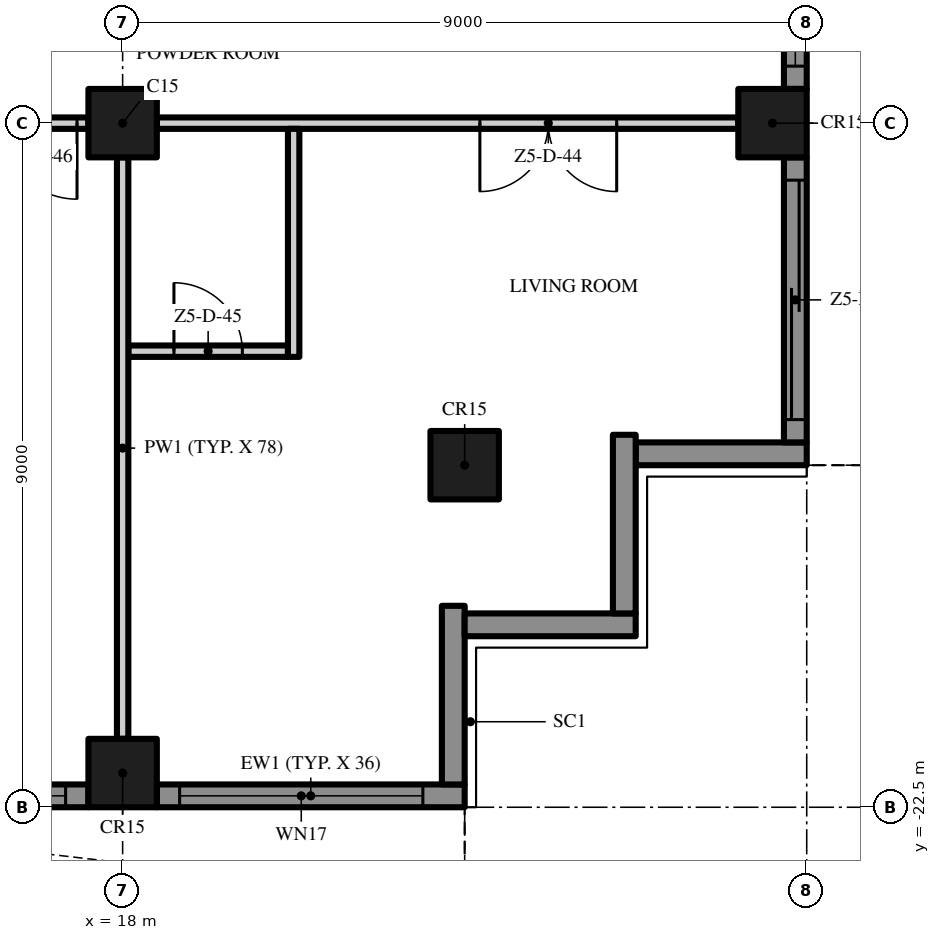
"""IFC4 building model, lengths in metres.
Left out: names, types, materials, properties, quantities, classifications, styles, units other than length and angle.
Written with IfcOpenShell. Run it as: python <this file> out.ifc"""

import sys

from ifc_helpers import new_model, si_unit, direction, frame, frame_2d, origin, origin_2d, place, context, subcontext, project, spatial, polyline, rectangle, outline, extrude, element, fill, save


model = new_model("IFC4")
c1 = context("Model", 3, precision=1e-05, world=origin(), true_north=direction((0.0, 1.0)))
c2 = subcontext(c1, "Body", "Model", "MODEL_VIEW")
j1 = project(units=[si_unit("LENGTHUNIT", "METRE"), si_unit("PLANEANGLEUNIT", "RADIAN")], contexts=[c1])
p1 = place(None, origin())
s1 = spatial("IfcSite", under=j1, at=p1, CompositionType="ELEMENT")
p2 = place(p1, origin())
s2 = spatial("IfcBuilding", under=s1, at=p2, CompositionType="ELEMENT")
p3 = place(p2, frame((0.0, 0.0, 276.8)))
s3 = spatial("IfcBuildingStorey", under=s2, at=p3, CompositionType="ELEMENT", Elevation=276.8)
for number, where, z_axis, x_axis in (
    (1, (18.0, -13.5, 0.0), (0.0, 0.0, 1.0), (1.0, 0.0, 0.0)),
    (2, (18.0, -22.05, 0.0), (0.0, 0.0, 1.0), (1.0, 0.0, 0.0)),
    (3, (26.55, -13.5, 0.0), (0.0, 0.0, 1.0), (1.0, 0.0, 0.0)),
    (4, (22.5, -18.0, 0.0), (0.0, 0.0, 1.0), (1.0, 0.0, 0.0)),
):
    element("IfcColumn", number, at=place(p3, frame(where, z_axis=z_axis, x_axis=x_axis)), inside=s3, PredefinedType="COLUMN", context=c2, shape_type="SweptSolid", body=[
        extrude(rectangle(XDim=0.9, YDim=0.9, at=origin_2d()), origin(), (0.0, 0.0, 1.0), 3.5),
    ])
p4 = place(p3, frame((17.55, -22.35, 0.0), z_axis=(0.0, 0.0, 1.0), x_axis=(-1.0, 0.0, 0.0)))
e5 = element("IfcWall", 5, at=p4, inside=s3, PredefinedType="SOLIDWALL", context=c2, shape_type="SweptSolid", body=[
    extrude(rectangle(XDim=8.1, YDim=0.3, at=frame_2d((4.05, 0.0))), origin(), (0.0, 0.0, 1.0), 3.5),
])
p5 = place(p4, frame((4.6, 0.0, 0.0)))
e6 = element("IfcOpeningElement", 6, at=p5, cuts=e5, PredefinedType="OPENING", context=c2, shape_type="SweptSolid", body=[
    extrude(rectangle(XDim=3.2, YDim=2.4, at=frame_2d((1.6, 1.2))), frame((0.0, 0.16, 0.0), z_axis=(0.0, -1.0, 0.0), x_axis=(1.0, 0.0, 0.0)), (0.0, 0.0, 1.0), 0.32),
])
p6 = place(p4, frame((0.3, 0.0, 0.45)))
e7 = element("IfcOpeningElement", 7, at=p6, cuts=e5, PredefinedType="OPENING", context=c2, shape_type="SweptSolid", body=[
    extrude(rectangle(XDim=3.2, YDim=2.65, at=frame_2d((1.6, 1.325))), frame((0.0, 0.16, 0.0), z_axis=(0.0, -1.0, 0.0), x_axis=(1.0, 0.0, 0.0)), (0.0, 0.0, 1.0), 0.32),
])
p7 = place(p3, frame((22.5, -22.35, 0.0), z_axis=(0.0, 0.0, 1.0), x_axis=(-1.0, 0.0, 0.0)))
e8 = element("IfcWall", 8, at=p7, inside=s3, PredefinedType="SOLIDWALL", context=c2, shape_type="SweptSolid", body=[
    extrude(rectangle(XDim=4.05, YDim=0.3, at=frame_2d((2.025, 0.0))), origin(), (0.0, 0.0, 1.0), 3.5),
])
p8 = place(p7, frame((0.55, 0.0, 0.45)))
e9 = element("IfcOpeningElement", 9, at=p8, cuts=e8, PredefinedType="OPENING", context=c2, shape_type="SweptSolid", body=[
    extrude(rectangle(XDim=3.2, YDim=2.65, at=frame_2d((1.6, 1.325))), frame((0.0, 0.16, 0.0), z_axis=(0.0, -1.0, 0.0), x_axis=(1.0, 0.0, 0.0)), (0.0, 0.0, 1.0), 0.32),
])
p9 = place(p3, frame((22.35, -19.85, 0.0), z_axis=(0.0, 0.0, 1.0), x_axis=(0.0, -1.0, 0.0)))
e10 = element("IfcWall", 10, at=p9, inside=s3, PredefinedType="SOLIDWALL", context=c2, shape_type="SweptSolid", body=[
    extrude(rectangle(XDim=2.35, YDim=0.3, at=frame_2d((1.175, 0.0))), origin(), (0.0, 0.0, 1.0), 3.5),
])
p10 = place(p3, frame((24.75, -20.1, 0.0), z_axis=(0.0, 0.0, 1.0), x_axis=(-1.0, 0.0, 0.0)))
e11 = element("IfcWall", 11, at=p10, inside=s3, PredefinedType="SOLIDWALL", context=c2, shape_type="SweptSolid", body=[
    extrude(rectangle(XDim=2.25, YDim=0.3, at=frame_2d((1.125, 0.0))), origin(), (0.0, 0.0, 1.0), 3.5),
])
p11 = place(p3, frame((24.6, -17.6, 0.0), z_axis=(0.0, 0.0, 1.0), x_axis=(0.0, -1.0, 0.0)))
e12 = element("IfcWall", 12, at=p11, inside=s3, PredefinedType="SOLIDWALL", context=c2, shape_type="SweptSolid", body=[
    extrude(rectangle(XDim=2.35, YDim=0.3, at=frame_2d((1.175, 0.0))), origin(), (0.0, 0.0, 1.0), 3.5),
])
p12 = place(p3, frame((27.0, -17.85, 0.0), z_axis=(0.0, 0.0, 1.0), x_axis=(-1.0, 0.0, 0.0)))
e13 = element("IfcWall", 13, at=p12, inside=s3, PredefinedType="SOLIDWALL", context=c2, shape_type="SweptSolid", body=[
    extrude(rectangle(XDim=2.25, YDim=0.3, at=frame_2d((1.125, 0.0))), origin(), (0.0, 0.0, 1.0), 3.5),
])
p13 = place(p3, frame((26.85, -13.95, 0.0), z_axis=(0.0, 0.0, 1.0), x_axis=(0.0, -1.0, 0.0)))
e14 = element("IfcWall", 14, at=p13, inside=s3, PredefinedType="SOLIDWALL", context=c2, shape_type="SweptSolid", body=[
    extrude(rectangle(XDim=3.75, YDim=0.3, at=frame_2d((1.875, 0.0))), origin(), (0.0, 0.0, 1.0), 3.5),
])
p14 = place(p13, frame((0.3, 0.0, 0.0)))
e15 = element("IfcOpeningElement", 15, at=p14, cuts=e14, PredefinedType="OPENING", context=c2, shape_type="SweptSolid", body=[
    extrude(rectangle(XDim=3.15, YDim=2.4, at=frame_2d((1.575, 1.2))), frame((0.0, 0.16, 0.0), z_axis=(0.0, -1.0, 0.0), x_axis=(1.0, 0.0, 0.0)), (0.0, 0.0, 1.0), 0.32),
])
p15 = place(p3, frame((26.85, -4.95, 0.0), z_axis=(0.0, 0.0, 1.0), x_axis=(0.0, -1.0, 0.0)))
e16 = element("IfcWall", 16, at=p15, inside=s3, PredefinedType="SOLIDWALL", context=c2, shape_type="SweptSolid", body=[
    extrude(rectangle(XDim=8.1, YDim=0.3, at=frame_2d((4.05, 0.0))), origin(), (0.0, 0.0, 1.0), 3.5),
])
p16 = place(p15, frame((4.6, 0.0, 0.45)))
e17 = element("IfcOpeningElement", 17, at=p16, cuts=e16, PredefinedType="OPENING", context=c2, shape_type="SweptSolid", body=[
    extrude(rectangle(XDim=3.2, YDim=2.65, at=frame_2d((1.6, 1.325))), frame((0.0, 0.16, 0.0), z_axis=(0.0, -1.0, 0.0), x_axis=(1.0, 0.0, 0.0)), (0.0, 0.0, 1.0), 0.32),
])
p17 = place(p15, frame((0.3, 0.0, 0.45)))
e18 = element("IfcOpeningElement", 18, at=p17, cuts=e16, PredefinedType="OPENING", context=c2, shape_type="SweptSolid", body=[
    extrude(rectangle(XDim=3.2, YDim=2.65, at=frame_2d((1.6, 1.325))), frame((0.0, 0.16, 0.0), z_axis=(0.0, -1.0, 0.0), x_axis=(1.0, 0.0, 0.0)), (0.0, 0.0, 1.0), 0.32),
])
p18 = place(p3, origin())
e19 = element("IfcWall", 19, at=p18, inside=s3, PredefinedType="USERDEFINED", context=c2, shape_type="SweptSolid", body=[
    extrude(outline(polyline([(-22.5, -25.149), (-21.0, -25.485), (-20.625, -25.5), (-19.5, -25.369), (-18.0, -24.845), (-16.5, -24.112), (-15.0, -23.451), (-13.5, -23.115), (-13.125, -23.1), (-12.0, -23.231), (-10.5, -23.755), (-9.0, -24.488), (-7.5, -25.149), (-6.0, -25.485), (-5.625, -25.5), (-4.5, -25.369), (-3.0, -24.845), (-1.5, -24.112), (0.0, -23.451), (1.5, -23.115), (1.875, -23.1), (3.0, -23.231), (4.5, -23.755), (6.0, -24.488), (7.5, -25.149), (9.0, -25.485), (9.375, -25.5), (10.5, -25.369), (12.0, -24.845), (13.5, -24.112), (15.0, -23.451), (16.5, -23.115), (16.875, -23.1), (18.0, -23.231), (19.5, -23.755), (21.0, -24.488), (22.5, -25.149), (22.601, -24.92), (21.105, -24.261), (19.596, -23.524), (18.056, -22.986), (16.885, -22.849), (16.467, -22.866), (14.921, -23.213), (13.395, -23.885), (11.904, -24.614), (10.444, -25.124), (9.365, -25.249), (9.033, -25.236), (7.579, -24.91), (6.105, -24.261), (4.596, -23.524), (3.056, -22.986), (1.885, -22.849), (1.467, -22.866), (-0.079, -23.213), (-1.605, -23.885), (-3.096, -24.614), (-4.556, -25.124), (-5.635, -25.249), (-5.967, -25.236), (-7.421, -24.91), (-8.895, -24.261), (-10.404, -23.524), (-11.944, -22.986), (-13.115, -22.849), (-13.533, -22.866), (-15.079, -23.213), (-16.605, -23.885), (-18.096, -24.614), (-19.556, -25.124), (-20.635, -25.249), (-20.967, -25.236), (-22.445, -24.905), (-22.5, -25.149)])), origin(), (0.0, 0.0, 1.0), 0.9),
])
p19 = place(p3, origin())
e20 = element("IfcWall", 20, at=p19, inside=s3, PredefinedType="USERDEFINED", context=c2, shape_type="SweptSolid", body=[
    extrude(outline(polyline([(29.649, -18.0), (29.985, -16.5), (30.0, -16.125), (29.869, -15.0), (29.345, -13.5), (28.612, -12.0), (27.951, -10.5), (27.615, -9.0), (27.6, -8.625), (27.731, -7.5), (28.255, -6.0), (28.988, -4.5), (29.649, -3.0), (29.985, -1.5), (30.0, -1.125), (29.869, 0.0), (29.345, 1.5), (28.612, 3.0), (27.951, 4.5), (27.615, 6.0), (27.6, 6.375), (27.731, 7.5), (28.255, 9.0), (28.988, 10.5), (29.649, 12.0), (29.985, 13.5), (30.0, 13.875), (29.869, 15.0), (29.345, 16.5), (28.612, 18.0), (28.388, 17.89), (29.114, 16.404), (29.624, 14.944), (29.749, 13.865), (29.736, 13.533), (29.41, 12.079), (28.761, 10.605), (28.024, 9.096), (27.486, 7.556), (27.349, 6.385), (27.366, 5.967), (27.713, 4.421), (28.385, 2.895), (29.114, 1.404), (29.624, -0.056), (29.749, -1.135), (29.736, -1.467), (29.41, -2.921), (28.761, -4.395), (28.024, -5.904), (27.486, -7.444), (27.349, -8.615), (27.366, -9.033), (27.713, -10.579), (28.385, -12.105), (29.114, -13.596), (29.624, -15.056), (29.749, -16.135), (29.736, -16.467), (29.405, -17.945), (29.649, -18.0)])), origin(), (0.0, 0.0, 1.0), 0.9),
])
p20 = place(p3, frame((18.075, -16.5, 0.0), z_axis=(0.0, 0.0, 1.0), x_axis=(1.0, 0.0, 0.0)))
e21 = element("IfcWall", 21, at=p20, inside=s3, PredefinedType="PARTITIONING", context=c2, shape_type="SweptSolid", body=[
    extrude(rectangle(XDim=2.1, YDim=0.15, at=frame_2d((1.05, 0.0))), origin(), (0.0, 0.0, 1.0), 3.5),
])
p21 = place(p20, frame((0.6, 0.0, 0.0)))
e22 = element("IfcOpeningElement", 22, at=p21, cuts=e21, PredefinedType="OPENING", context=c2, shape_type="SweptSolid", body=[
    extrude(rectangle(XDim=0.9, YDim=2.1, at=frame_2d((0.45, 1.05))), frame((0.0, 0.085, 0.0), z_axis=(0.0, -1.0, 0.0), x_axis=(1.0, 0.0, 0.0)), (0.0, 0.0, 1.0), 0.17),
])
p22 = place(p3, frame((17.55, -13.5, 0.0), z_axis=(0.0, 0.0, 1.0), x_axis=(-1.0, 0.0, 0.0)))
e23 = element("IfcWall", 23, at=p22, inside=s3, PredefinedType="PARTITIONING", context=c2, shape_type="SweptSolid", body=[
    extrude(rectangle(XDim=8.1, YDim=0.15, at=frame_2d((4.05, 0.0))), origin(), (0.0, 0.0, 1.0), 3.5),
])
p23 = place(p22, frame((0.15, 0.0, 0.0)))
e24 = element("IfcOpeningElement", 24, at=p23, cuts=e23, PredefinedType="OPENING", context=c2, shape_type="SweptSolid", body=[
    extrude(rectangle(XDim=1.0, YDim=2.4, at=frame_2d((0.5, 1.2))), frame((0.0, 0.085, 0.0), z_axis=(0.0, -1.0, 0.0), x_axis=(1.0, 0.0, 0.0)), (0.0, 0.0, 1.0), 0.17),
])
p24 = place(p22, frame((6.95, 0.0, 0.0)))
e25 = element("IfcOpeningElement", 25, at=p24, cuts=e23, PredefinedType="OPENING", context=c2, shape_type="SweptSolid", body=[
    extrude(rectangle(XDim=1.0, YDim=2.4, at=frame_2d((0.5, 1.2))), frame((0.0, 0.085, 0.0), z_axis=(0.0, -1.0, 0.0), x_axis=(1.0, 0.0, 0.0)), (0.0, 0.0, 1.0), 0.17),
])
p25 = place(p3, frame((26.1, -13.5, 0.0), z_axis=(0.0, 0.0, 1.0), x_axis=(-1.0, 0.0, 0.0)))
e26 = element("IfcWall", 26, at=p25, inside=s3, PredefinedType="PARTITIONING", context=c2, shape_type="SweptSolid", body=[
    extrude(rectangle(XDim=7.65, YDim=0.15, at=frame_2d((3.825, 0.0))), origin(), (0.0, 0.0, 1.0), 3.5),
])
p26 = place(p25, frame((1.6, 0.0, 0.0)))
e27 = element("IfcOpeningElement", 27, at=p26, cuts=e26, PredefinedType="OPENING", context=c2, shape_type="SweptSolid", body=[
    extrude(rectangle(XDim=1.8, YDim=2.4, at=frame_2d((0.9, 1.2))), frame((0.0, 0.085, 0.0), z_axis=(0.0, -1.0, 0.0), x_axis=(1.0, 0.0, 0.0)), (0.0, 0.0, 1.0), 0.17),
])
p27 = place(p3, frame((18.0, -21.6, 0.0), z_axis=(0.0, 0.0, 1.0), x_axis=(0.0, 1.0, 0.0)))
e28 = element("IfcWall", 28, at=p27, inside=s3, PredefinedType="PARTITIONING", context=c2, shape_type="SweptSolid", body=[
    extrude(rectangle(XDim=7.65, YDim=0.15, at=frame_2d((3.825, 0.0))), origin(), (0.0, 0.0, 1.0), 3.5),
])
p28 = place(p3, frame((20.25, -16.575, 0.0), z_axis=(0.0, 0.0, 1.0), x_axis=(0.0, 1.0, 0.0)))
e29 = element("IfcWall", 29, at=p28, inside=s3, PredefinedType="PARTITIONING", context=c2, shape_type="SweptSolid", body=[
    extrude(rectangle(XDim=3.0, YDim=0.15, at=frame_2d((1.5, 0.0))), origin(), (0.0, 0.0, 1.0), 3.5),
])
p29 = place(p6, origin())
e30 = element("IfcWindow", 30, at=p29, inside=s3, PartitioningType="SINGLE_PANEL", PredefinedType="WINDOW", context=c2, shape_type="SweptSolid", body=[
    extrude(rectangle(XDim=3.2, YDim=2.65, at=frame_2d((1.6, 1.325))), frame((0.0, 0.03, 0.0), z_axis=(0.0, -1.0, 0.0), x_axis=(1.0, 0.0, 0.0)), (0.0, 0.0, 1.0), 0.06),
])
fill(e7, e30)
p30 = place(p8, origin())
e31 = element("IfcWindow", 31, at=p30, inside=s3, PartitioningType="SINGLE_PANEL", PredefinedType="WINDOW", context=c2, shape_type="SweptSolid", body=[
    extrude(rectangle(XDim=3.2, YDim=2.65, at=frame_2d((1.6, 1.325))), frame((0.0, 0.03, 0.0), z_axis=(0.0, -1.0, 0.0), x_axis=(1.0, 0.0, 0.0)), (0.0, 0.0, 1.0), 0.06),
])
fill(e9, e31)
p31 = place(p14, origin())
e32 = element("IfcDoor", 32, at=p31, inside=s3, OperationType="SINGLE_SWING_LEFT", PredefinedType="DOOR", context=c2, shape_type="SweptSolid", body=[
    extrude(rectangle(XDim=3.15, YDim=2.4, at=frame_2d((1.575, 1.2))), frame((0.0, 0.025, 0.0), z_axis=(0.0, -1.0, 0.0), x_axis=(1.0, 0.0, 0.0)), (0.0, 0.0, 1.0), 0.05),
])
fill(e15, e32)
p32 = place(p16, origin())
e33 = element("IfcWindow", 33, at=p32, inside=s3, PartitioningType="SINGLE_PANEL", PredefinedType="WINDOW", context=c2, shape_type="SweptSolid", body=[
    extrude(rectangle(XDim=3.2, YDim=2.65, at=frame_2d((1.6, 1.325))), frame((0.0, 0.03, 0.0), z_axis=(0.0, -1.0, 0.0), x_axis=(1.0, 0.0, 0.0)), (0.0, 0.0, 1.0), 0.06),
])
fill(e17, e33)
p33 = place(p26, origin())
e34 = element("IfcDoor", 34, at=p33, inside=s3, OperationType="DOUBLE_DOOR_SINGLE_SWING", PredefinedType="DOOR", context=c2, shape_type="SweptSolid", body=[
    extrude(rectangle(XDim=1.8, YDim=2.4, at=frame_2d((0.9, 1.2))), frame((0.0, 0.025, 0.0), z_axis=(0.0, -1.0, 0.0), x_axis=(1.0, 0.0, 0.0)), (0.0, 0.0, 1.0), 0.05),
])
fill(e27, e34)
p34 = place(p21, origin())
e35 = element("IfcDoor", 35, at=p34, inside=s3, OperationType="SINGLE_SWING_LEFT", PredefinedType="DOOR", context=c2, shape_type="SweptSolid", body=[
    extrude(rectangle(XDim=0.9, YDim=2.1, at=frame_2d((0.45, 1.05))), frame((0.0, 0.025, 0.0), z_axis=(0.0, -1.0, 0.0), x_axis=(1.0, 0.0, 0.0)), (0.0, 0.0, 1.0), 0.05),
])
fill(e22, e35)
p35 = place(p23, origin())
e36 = element("IfcDoor", 36, at=p35, inside=s3, OperationType="SINGLE_SWING_LEFT", PredefinedType="DOOR", context=c2, shape_type="SweptSolid", body=[
    extrude(rectangle(XDim=1.0, YDim=2.4, at=frame_2d((0.5, 1.2))), frame((0.0, 0.025, 0.0), z_axis=(0.0, -1.0, 0.0), x_axis=(1.0, 0.0, 0.0)), (0.0, 0.0, 1.0), 0.05),
])
fill(e24, e36)
save(model, sys.argv[1])
